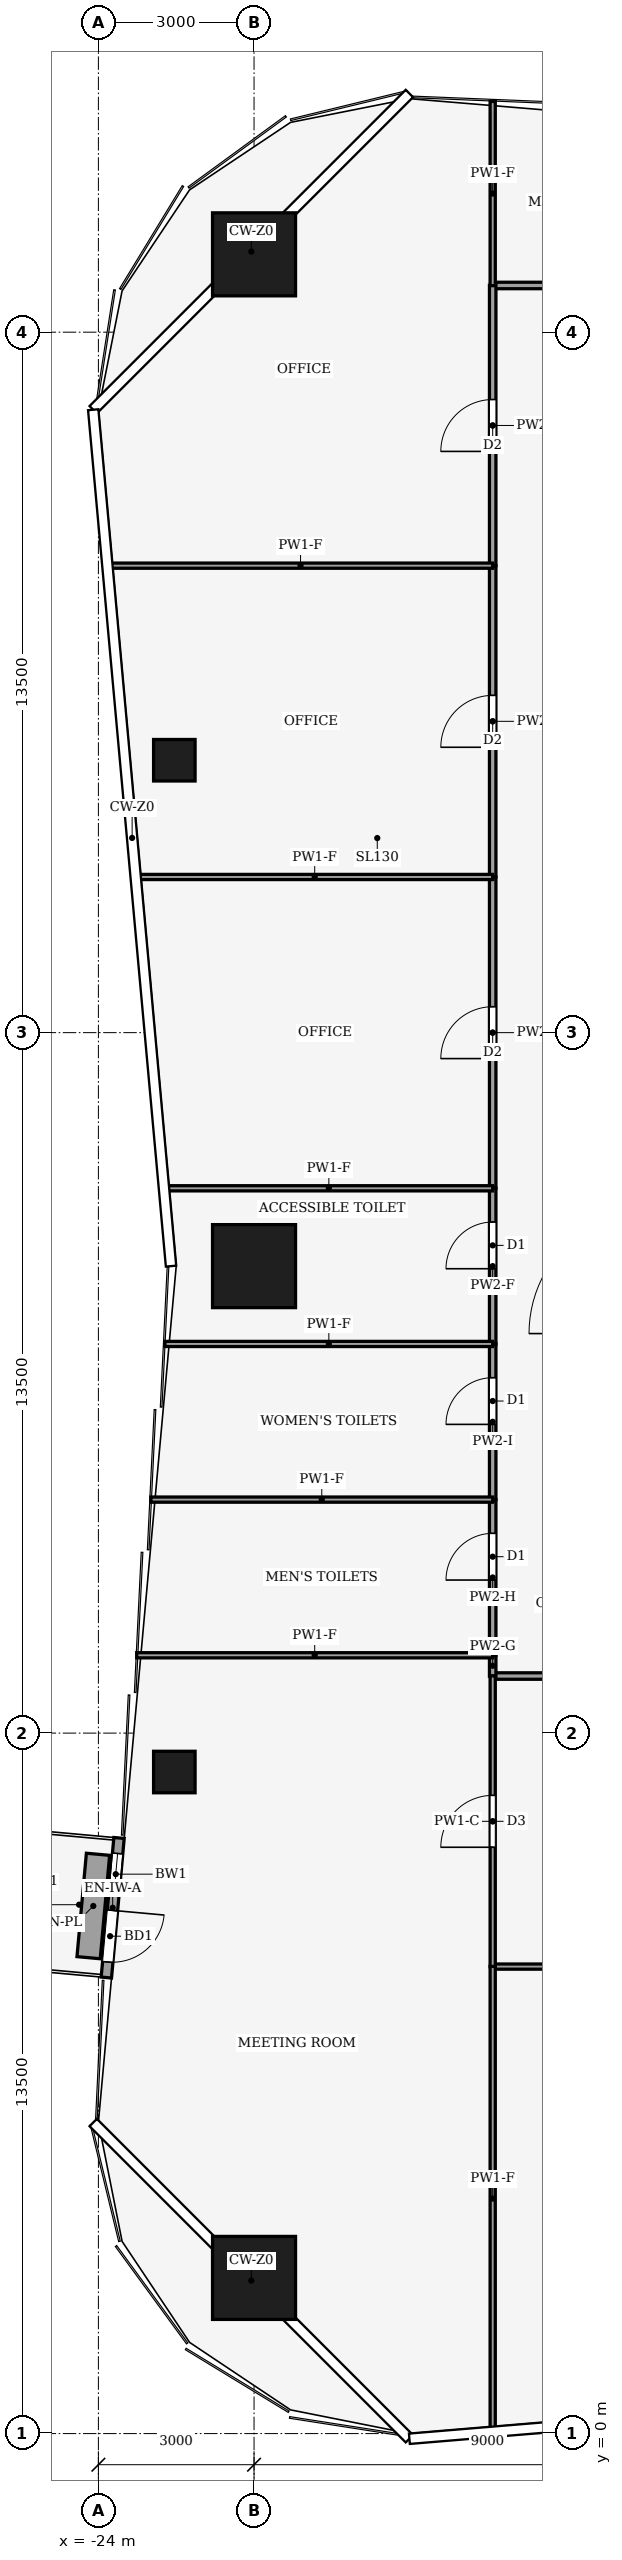
"""IFC4 building model, lengths in metres.
Left out: names, types, materials, properties, quantities, classifications, styles, units other than length and angle.
Written with IfcOpenShell. Run it as: python <this file> out.ifc"""

import sys

from ifc_helpers import new_model, si_unit, direction, frame, frame_2d, origin, origin_2d, place, context, subcontext, project, spatial, rectangle, hollow_rectangle, extrude, element, fill, save


model = new_model("IFC4")
c1 = context("Model", 3, precision=1e-05, world=origin(), true_north=direction((0.0, 1.0)))
c2 = subcontext(c1, "Body", "Model", "MODEL_VIEW")
j1 = project(units=[si_unit("LENGTHUNIT", "METRE"), si_unit("PLANEANGLEUNIT", "RADIAN")], contexts=[c1])
p1 = place(None, origin())
s1 = spatial("IfcSite", under=j1, at=p1, CompositionType="ELEMENT")
p2 = place(p1, origin())
s2 = spatial("IfcBuilding", under=s1, at=p2, CompositionType="ELEMENT")
p3 = place(p2, frame((0.0, 0.0, 22.0)))
s3 = spatial("IfcBuildingStorey", under=s2, at=p3, CompositionType="ELEMENT", Elevation=22.0)
for number, where, z_axis, x_axis in (
    (1, (-21.0, 42.0, 0.0), (0.0, 0.0, 1.0), (1.0, 0.0, 0.0)),
    (2, (-21.0, 3.0, 0.0), (0.0, 0.0, 1.0), (1.0, 0.0, 0.0)),
    (3, (-21.0, 22.5, 0.0), (0.0, 0.0, 1.0), (1.0, 0.0, 0.0)),
):
    element("IfcColumn", number, at=place(p3, frame(where, z_axis=z_axis, x_axis=x_axis)), inside=s3, PredefinedType="COLUMN", context=c2, shape_type="SweptSolid", body=[
        extrude(hollow_rectangle(XDim=1.6, YDim=1.6, WallThickness=0.09, at=origin_2d()), origin(), (0.0, 0.0, 1.0), 4.0),
    ])
for number, where, z_axis, x_axis in (
    (4, (-22.536, 12.75, 0.0), (0.0, 0.0, 1.0), (1.0, 0.0, 0.0)),
    (5, (-22.536, 32.25, 0.0), (0.0, 0.0, 1.0), (1.0, 0.0, 0.0)),
):
    element("IfcColumn", number, at=place(p3, frame(where, z_axis=z_axis, x_axis=x_axis)), inside=s3, PredefinedType="COLUMN", context=c2, shape_type="SweptSolid", body=[
        extrude(hollow_rectangle(XDim=0.8, YDim=0.8, WallThickness=0.04, at=origin_2d()), origin(), (0.0, 0.0, 1.0), 4.0),
    ])
p4 = place(p3, frame((-23.602, 11.479, 0.0), z_axis=(0.0, 0.0, 1.0), x_axis=(-0.090552042494, -0.995891724838, 0.0)))
e6 = element("IfcWall", 6, at=p4, inside=s3, PredefinedType="SOLIDWALL", context=c2, shape_type="SweptSolid", body=[
    extrude(rectangle(XDim=2.701, YDim=0.2, at=frame_2d((1.351, 0.0))), origin(), (0.0, 0.0, 1.0), 3.65),
])
p5 = place(p4, frame((1.401, 0.0, 0.0)))
e7 = element("IfcOpeningElement", 7, at=p5, cuts=e6, PredefinedType="OPENING", context=c2, shape_type="SweptSolid", body=[
    extrude(rectangle(XDim=1.0, YDim=2.1, at=frame_2d((0.5, 1.05))), frame((0.0, 0.11, 0.0), z_axis=(0.0, -1.0, 0.0), x_axis=(1.0, 0.0, 0.0)), (0.0, 0.0, 1.0), 0.22),
])
p6 = place(p4, frame((0.3, 0.0, 0.9)))
e8 = element("IfcOpeningElement", 8, at=p6, cuts=e6, PredefinedType="OPENING", context=c2, shape_type="SweptSolid", body=[
    extrude(rectangle(XDim=0.8, YDim=1.2, at=frame_2d((0.4, 0.6))), frame((0.0, 0.11, 0.0), z_axis=(0.0, -1.0, 0.0), x_axis=(1.0, 0.0, 0.0)), (0.0, 0.0, 1.0), 0.22),
])
p7 = place(p3, frame((-24.008, 11.165, 0.0), z_axis=(0.0, 0.0, 1.0), x_axis=(-0.090513748512, -0.995895205998, 0.0)))
e9 = element("IfcWall", 9, at=p7, inside=s3, PredefinedType="USERDEFINED", context=c2, shape_type="SweptSolid", body=[
    extrude(rectangle(XDim=2.001, YDim=0.45, at=frame_2d((1.001, 0.0))), origin(), (0.0, 0.0, 1.0), 0.4),
])
p8 = place(p3, frame((-12.0, 14.6, 0.0), z_axis=(0.0, 0.0, 1.0), x_axis=(-1.0, 0.0, 0.0)))
e10 = element("IfcWall", 10, at=p8, inside=s3, PredefinedType="PARTITIONING", context=c2, shape_type="SweptSolid", body=[
    extrude(rectangle(XDim=4.4, YDim=0.125, at=frame_2d((2.2, 0.0))), origin(), (0.0, 0.0, 1.0), 3.29),
])
p9 = place(p8, frame((1.7, 0.0, 0.0)))
e11 = element("IfcOpeningElement", 11, at=p9, cuts=e10, PredefinedType="OPENING", context=c2, shape_type="SweptSolid", body=[
    extrude(rectangle(XDim=1.0, YDim=2.1, at=frame_2d((0.5, 1.05))), frame((0.0, 0.073, 0.0), z_axis=(0.0, -1.0, 0.0), x_axis=(1.0, 0.0, 0.0)), (0.0, 0.0, 1.0), 0.145),
])
p10 = place(p3, frame((-16.4, 41.4, 0.0), z_axis=(0.0, 0.0, 1.0), x_axis=(1.0, 0.0, 0.0)))
e12 = element("IfcWall", 12, at=p10, inside=s3, PredefinedType="PARTITIONING", context=c2, shape_type="SweptSolid", body=[
    extrude(rectangle(XDim=13.4, YDim=0.125, at=frame_2d((6.7, 0.0))), origin(), (0.0, 0.0, 1.0), 3.54),
])
p11 = place(p10, frame((7.4, 0.0, 0.0)))
e13 = element("IfcOpeningElement", 13, at=p11, cuts=e12, PredefinedType="OPENING", context=c2, shape_type="SweptSolid", body=[
    extrude(rectangle(XDim=1.0, YDim=2.1, at=frame_2d((0.5, 1.05))), frame((0.0, 0.073, 0.0), z_axis=(0.0, -1.0, 0.0), x_axis=(1.0, 0.0, 0.0)), (0.0, 0.0, 1.0), 0.145),
])
p12 = place(p3, frame((-16.4, 15.0, 0.0), z_axis=(0.0, 0.0, 1.0), x_axis=(0.0, -1.0, 0.0)))
e14 = element("IfcWall", 14, at=p12, inside=s3, PredefinedType="PARTITIONING", context=c2, shape_type="SweptSolid", body=[
    extrude(rectangle(XDim=0.404, YDim=0.125, at=frame_2d((0.202, 0.0))), origin(), (0.0, 0.0, 1.0), 3.87),
])
p13 = place(p3, frame((-16.4, 15.0, 0.0), z_axis=(0.0, 0.0, 1.0), x_axis=(0.0, 1.0, 0.0)))
e15 = element("IfcWall", 15, at=p13, inside=s3, PredefinedType="PARTITIONING", context=c2, shape_type="SweptSolid", body=[
    extrude(rectangle(XDim=3.0, YDim=0.125, at=frame_2d((1.5, 0.0))), origin(), (0.0, 0.0, 1.0), 3.14),
])
p14 = place(p13, frame((1.45, 0.0, 0.0)))
e16 = element("IfcOpeningElement", 16, at=p14, cuts=e15, PredefinedType="OPENING", context=c2, shape_type="SweptSolid", body=[
    extrude(rectangle(XDim=0.9, YDim=2.1, at=frame_2d((0.45, 1.05))), frame((0.0, 0.073, 0.0), z_axis=(0.0, -1.0, 0.0), x_axis=(1.0, 0.0, 0.0)), (0.0, 0.0, 1.0), 0.145),
])
p15 = place(p3, frame((-16.4, 18.0, 0.0), z_axis=(0.0, 0.0, 1.0), x_axis=(0.0, 1.0, 0.0)))
e17 = element("IfcWall", 17, at=p15, inside=s3, PredefinedType="PARTITIONING", context=c2, shape_type="SweptSolid", body=[
    extrude(rectangle(XDim=3.0, YDim=0.125, at=frame_2d((1.5, 0.0))), origin(), (0.0, 0.0, 1.0), 3.48),
])
p16 = place(p15, frame((1.45, 0.0, 0.0)))
e18 = element("IfcOpeningElement", 18, at=p16, cuts=e17, PredefinedType="OPENING", context=c2, shape_type="SweptSolid", body=[
    extrude(rectangle(XDim=0.9, YDim=2.1, at=frame_2d((0.45, 1.05))), frame((0.0, 0.073, 0.0), z_axis=(0.0, -1.0, 0.0), x_axis=(1.0, 0.0, 0.0)), (0.0, 0.0, 1.0), 0.145),
])
p17 = place(p3, frame((-16.4, 21.0, 0.0), z_axis=(0.0, 0.0, 1.0), x_axis=(0.0, 1.0, 0.0)))
e19 = element("IfcWall", 19, at=p17, inside=s3, PredefinedType="PARTITIONING", context=c2, shape_type="SweptSolid", body=[
    extrude(rectangle(XDim=3.0, YDim=0.125, at=frame_2d((1.5, 0.0))), origin(), (0.0, 0.0, 1.0), 3.54),
])
p18 = place(p17, frame((1.45, 0.0, 0.0)))
e20 = element("IfcOpeningElement", 20, at=p18, cuts=e19, PredefinedType="OPENING", context=c2, shape_type="SweptSolid", body=[
    extrude(rectangle(XDim=0.9, YDim=2.1, at=frame_2d((0.45, 1.05))), frame((0.0, 0.073, 0.0), z_axis=(0.0, -1.0, 0.0), x_axis=(1.0, 0.0, 0.0)), (0.0, 0.0, 1.0), 0.145),
])
p19 = place(p3, frame((-16.4, 24.0, 0.0), z_axis=(0.0, 0.0, 1.0), x_axis=(0.0, 1.0, 0.0)))
e21 = element("IfcWall", 21, at=p19, inside=s3, PredefinedType="PARTITIONING", context=c2, shape_type="SweptSolid", body=[
    extrude(rectangle(XDim=6.0, YDim=0.125, at=frame_2d((3.0, 0.0))), origin(), (0.0, 0.0, 1.0), 3.48),
])
p20 = place(p19, frame((2.5, 0.0, 0.0)))
e22 = element("IfcOpeningElement", 22, at=p20, cuts=e21, PredefinedType="OPENING", context=c2, shape_type="SweptSolid", body=[
    extrude(rectangle(XDim=1.0, YDim=2.1, at=frame_2d((0.5, 1.05))), frame((0.0, 0.073, 0.0), z_axis=(0.0, -1.0, 0.0), x_axis=(1.0, 0.0, 0.0)), (0.0, 0.0, 1.0), 0.145),
])
p21 = place(p3, frame((-16.4, 30.0, 0.0), z_axis=(0.0, 0.0, 1.0), x_axis=(0.0, 1.0, 0.0)))
e23 = element("IfcWall", 23, at=p21, inside=s3, PredefinedType="PARTITIONING", context=c2, shape_type="SweptSolid", body=[
    extrude(rectangle(XDim=6.0, YDim=0.125, at=frame_2d((3.0, 0.0))), origin(), (0.0, 0.0, 1.0), 3.48),
])
p22 = place(p21, frame((2.5, 0.0, 0.0)))
e24 = element("IfcOpeningElement", 24, at=p22, cuts=e23, PredefinedType="OPENING", context=c2, shape_type="SweptSolid", body=[
    extrude(rectangle(XDim=1.0, YDim=2.1, at=frame_2d((0.5, 1.05))), frame((0.0, 0.073, 0.0), z_axis=(0.0, -1.0, 0.0), x_axis=(1.0, 0.0, 0.0)), (0.0, 0.0, 1.0), 0.145),
])
p23 = place(p3, frame((-16.4, 36.0, 0.0), z_axis=(0.0, 0.0, 1.0), x_axis=(0.0, 1.0, 0.0)))
e25 = element("IfcWall", 25, at=p23, inside=s3, PredefinedType="PARTITIONING", context=c2, shape_type="SweptSolid", body=[
    extrude(rectangle(XDim=5.404, YDim=0.125, at=frame_2d((2.702, 0.0))), origin(), (0.0, 0.0, 1.0), 3.14),
])
p24 = place(p23, frame((2.202, 0.0, 0.0)))
e26 = element("IfcOpeningElement", 26, at=p24, cuts=e25, PredefinedType="OPENING", context=c2, shape_type="SweptSolid", body=[
    extrude(rectangle(XDim=1.0, YDim=2.1, at=frame_2d((0.5, 1.05))), frame((0.0, 0.073, 0.0), z_axis=(0.0, -1.0, 0.0), x_axis=(1.0, 0.0, 0.0)), (0.0, 0.0, 1.0), 0.145),
])
p25 = place(p3, frame((-11.996, 9.0, 0.0), z_axis=(0.0, 0.0, 1.0), x_axis=(-1.0, 0.0, 0.0)))
e27 = element("IfcWall", 27, at=p25, inside=s3, PredefinedType="PARTITIONING", context=c2, shape_type="SweptSolid", body=[
    extrude(rectangle(XDim=4.404, YDim=0.1, at=frame_2d((2.202, 0.0))), origin(), (0.0, 0.0, 1.0), 3.29),
])
p26 = place(p25, frame((1.702, 0.0, 0.0)))
e28 = element("IfcOpeningElement", 28, at=p26, cuts=e27, PredefinedType="OPENING", context=c2, shape_type="SweptSolid", body=[
    extrude(rectangle(XDim=1.0, YDim=2.1, at=frame_2d((0.5, 1.05))), frame((0.0, 0.06, 0.0), z_axis=(0.0, -1.0, 0.0), x_axis=(1.0, 0.0, 0.0)), (0.0, 0.0, 1.0), 0.12),
])
p27 = place(p3, frame((-16.4, 8.996, 0.0), z_axis=(0.0, 0.0, 1.0), x_axis=(0.0, 1.0, 0.0)))
e29 = element("IfcWall", 29, at=p27, inside=s3, PredefinedType="PARTITIONING", context=c2, shape_type="SweptSolid", body=[
    extrude(rectangle(XDim=5.608, YDim=0.1, at=frame_2d((2.804, 0.0))), origin(), (0.0, 0.0, 1.0), 3.87),
])
p28 = place(p27, frame((2.304, 0.0, 0.0)))
e30 = element("IfcOpeningElement", 30, at=p28, cuts=e29, PredefinedType="OPENING", context=c2, shape_type="SweptSolid", body=[
    extrude(rectangle(XDim=1.0, YDim=2.1, at=frame_2d((0.5, 1.05))), frame((0.0, 0.06, 0.0), z_axis=(0.0, -1.0, 0.0), x_axis=(1.0, 0.0, 0.0)), (0.0, 0.0, 1.0), 0.12),
])
p29 = place(p3, frame((-16.4, 9.004, 0.0), z_axis=(0.0, 0.0, 1.0), x_axis=(0.0, -1.0, 0.0)))
e31 = element("IfcWall", 31, at=p29, inside=s3, PredefinedType="PARTITIONING", context=c2, shape_type="SweptSolid", body=[
    extrude(rectangle(XDim=8.951, YDim=0.1, at=frame_2d((4.475, 0.0))), origin(), (0.0, 0.0, 1.0), 3.04),
])
p30 = place(p3, frame((-16.4, 44.947, 0.0), z_axis=(0.0, 0.0, 1.0), x_axis=(0.0, -1.0, 0.0)))
e32 = element("IfcWall", 32, at=p30, inside=s3, PredefinedType="PARTITIONING", context=c2, shape_type="SweptSolid", body=[
    extrude(rectangle(XDim=3.551, YDim=0.1, at=frame_2d((1.775, 0.0))), origin(), (0.0, 0.0, 1.0), 3.04),
])
p31 = place(p3, frame((-16.4, 15.0, 0.0), z_axis=(0.0, 0.0, 1.0), x_axis=(-1.0, 0.0, 0.0)))
e33 = element("IfcWall", 33, at=p31, inside=s3, PredefinedType="PARTITIONING", context=c2, shape_type="SweptSolid", body=[
    extrude(rectangle(XDim=6.862, YDim=0.1, at=frame_2d((3.431, 0.0))), origin(), (0.0, 0.0, 1.0), 3.04),
])
p32 = place(p3, frame((-16.4, 18.0, 0.0), z_axis=(0.0, 0.0, 1.0), x_axis=(-1.0, 0.0, 0.0)))
e34 = element("IfcWall", 34, at=p32, inside=s3, PredefinedType="PARTITIONING", context=c2, shape_type="SweptSolid", body=[
    extrude(rectangle(XDim=6.589, YDim=0.1, at=frame_2d((3.294, 0.0))), origin(), (0.0, 0.0, 1.0), 3.04),
])
for number, where, z_axis, x_axis in (
    (35, (-16.4, 21.0, 0.0), (0.0, 0.0, 1.0), (-1.0, 0.0, 0.0)),
    (36, (-16.4, 24.0, 0.0), (0.0, 0.0, 1.0), (-1.0, 0.0, 0.0)),
):
    element("IfcWall", number, at=place(p3, frame(where, z_axis=z_axis, x_axis=x_axis)), inside=s3, PredefinedType="PARTITIONING", context=c2, shape_type="SweptSolid", body=[
        extrude(rectangle(XDim=6.316, YDim=0.1, at=frame_2d((3.158, 0.0))), origin(), (0.0, 0.0, 1.0), 3.04),
    ])
p33 = place(p3, frame((-16.4, 30.0, 0.0), z_axis=(0.0, 0.0, 1.0), x_axis=(-1.0, 0.0, 0.0)))
e37 = element("IfcWall", 37, at=p33, inside=s3, PredefinedType="PARTITIONING", context=c2, shape_type="SweptSolid", body=[
    extrude(rectangle(XDim=6.862, YDim=0.1, at=frame_2d((3.431, 0.0))), origin(), (0.0, 0.0, 1.0), 3.04),
])
p34 = place(p3, frame((-16.4, 36.0, 0.0), z_axis=(0.0, 0.0, 1.0), x_axis=(-1.0, 0.0, 0.0)))
e38 = element("IfcWall", 38, at=p34, inside=s3, PredefinedType="PARTITIONING", context=c2, shape_type="SweptSolid", body=[
    extrude(rectangle(XDim=7.407, YDim=0.1, at=frame_2d((3.704, 0.0))), origin(), (0.0, 0.0, 1.0), 3.04),
])
p35 = place(p5, origin())
e39 = element("IfcDoor", 39, at=p35, inside=s3, OperationType="SINGLE_SWING_RIGHT", PredefinedType="DOOR", context=c2, shape_type="SweptSolid", body=[
    extrude(rectangle(XDim=1.0, YDim=2.1, at=frame_2d((0.5, 1.05))), frame((0.0, 0.025, 0.0), z_axis=(0.0, -1.0, 0.0), x_axis=(1.0, 0.0, 0.0)), (0.0, 0.0, 1.0), 0.05),
])
fill(e7, e39)
p36 = place(p6, origin())
e40 = element("IfcWindow", 40, at=p36, inside=s3, PartitioningType="SINGLE_PANEL", PredefinedType="WINDOW", context=c2, shape_type="SweptSolid", body=[
    extrude(rectangle(XDim=0.8, YDim=1.2, at=frame_2d((0.4, 0.6))), frame((0.0, 0.03, 0.0), z_axis=(0.0, -1.0, 0.0), x_axis=(1.0, 0.0, 0.0)), (0.0, 0.0, 1.0), 0.06),
])
fill(e8, e40)
p37 = place(p14, origin())
e41 = element("IfcDoor", 41, at=p37, inside=s3, OperationType="SINGLE_SWING_RIGHT", PredefinedType="DOOR", context=c2, shape_type="SweptSolid", body=[
    extrude(rectangle(XDim=0.9, YDim=2.1, at=frame_2d((0.45, 1.05))), frame((0.0, 0.025, 0.0), z_axis=(0.0, -1.0, 0.0), x_axis=(1.0, 0.0, 0.0)), (0.0, 0.0, 1.0), 0.05),
])
fill(e16, e41)
p38 = place(p16, origin())
e42 = element("IfcDoor", 42, at=p38, inside=s3, OperationType="SINGLE_SWING_RIGHT", PredefinedType="DOOR", context=c2, shape_type="SweptSolid", body=[
    extrude(rectangle(XDim=0.9, YDim=2.1, at=frame_2d((0.45, 1.05))), frame((0.0, 0.025, 0.0), z_axis=(0.0, -1.0, 0.0), x_axis=(1.0, 0.0, 0.0)), (0.0, 0.0, 1.0), 0.05),
])
fill(e18, e42)
p39 = place(p18, origin())
e43 = element("IfcDoor", 43, at=p39, inside=s3, OperationType="SINGLE_SWING_RIGHT", PredefinedType="DOOR", context=c2, shape_type="SweptSolid", body=[
    extrude(rectangle(XDim=0.9, YDim=2.1, at=frame_2d((0.45, 1.05))), frame((0.0, 0.025, 0.0), z_axis=(0.0, -1.0, 0.0), x_axis=(1.0, 0.0, 0.0)), (0.0, 0.0, 1.0), 0.05),
])
fill(e20, e43)
p40 = place(p20, origin())
e44 = element("IfcDoor", 44, at=p40, inside=s3, OperationType="SINGLE_SWING_LEFT", PredefinedType="DOOR", context=c2, shape_type="SweptSolid", body=[
    extrude(rectangle(XDim=1.0, YDim=2.1, at=frame_2d((0.5, 1.05))), frame((0.0, 0.025, 0.0), z_axis=(0.0, -1.0, 0.0), x_axis=(1.0, 0.0, 0.0)), (0.0, 0.0, 1.0), 0.05),
])
fill(e22, e44)
p41 = place(p22, origin())
e45 = element("IfcDoor", 45, at=p41, inside=s3, OperationType="SINGLE_SWING_RIGHT", PredefinedType="DOOR", context=c2, shape_type="SweptSolid", body=[
    extrude(rectangle(XDim=1.0, YDim=2.1, at=frame_2d((0.5, 1.05))), frame((0.0, 0.025, 0.0), z_axis=(0.0, -1.0, 0.0), x_axis=(1.0, 0.0, 0.0)), (0.0, 0.0, 1.0), 0.05),
])
fill(e24, e45)
p42 = place(p24, origin())
e46 = element("IfcDoor", 46, at=p42, inside=s3, OperationType="SINGLE_SWING_LEFT", PredefinedType="DOOR", context=c2, shape_type="SweptSolid", body=[
    extrude(rectangle(XDim=1.0, YDim=2.1, at=frame_2d((0.5, 1.05))), frame((0.0, 0.025, 0.0), z_axis=(0.0, -1.0, 0.0), x_axis=(1.0, 0.0, 0.0)), (0.0, 0.0, 1.0), 0.05),
])
fill(e26, e46)
p43 = place(p28, origin())
e47 = element("IfcDoor", 47, at=p43, inside=s3, OperationType="SINGLE_SWING_RIGHT", PredefinedType="DOOR", context=c2, shape_type="SweptSolid", body=[
    extrude(rectangle(XDim=1.0, YDim=2.1, at=frame_2d((0.5, 1.05))), frame((0.0, 0.025, 0.0), z_axis=(0.0, -1.0, 0.0), x_axis=(1.0, 0.0, 0.0)), (0.0, 0.0, 1.0), 0.05),
])
fill(e30, e47)
save(model, sys.argv[1])
